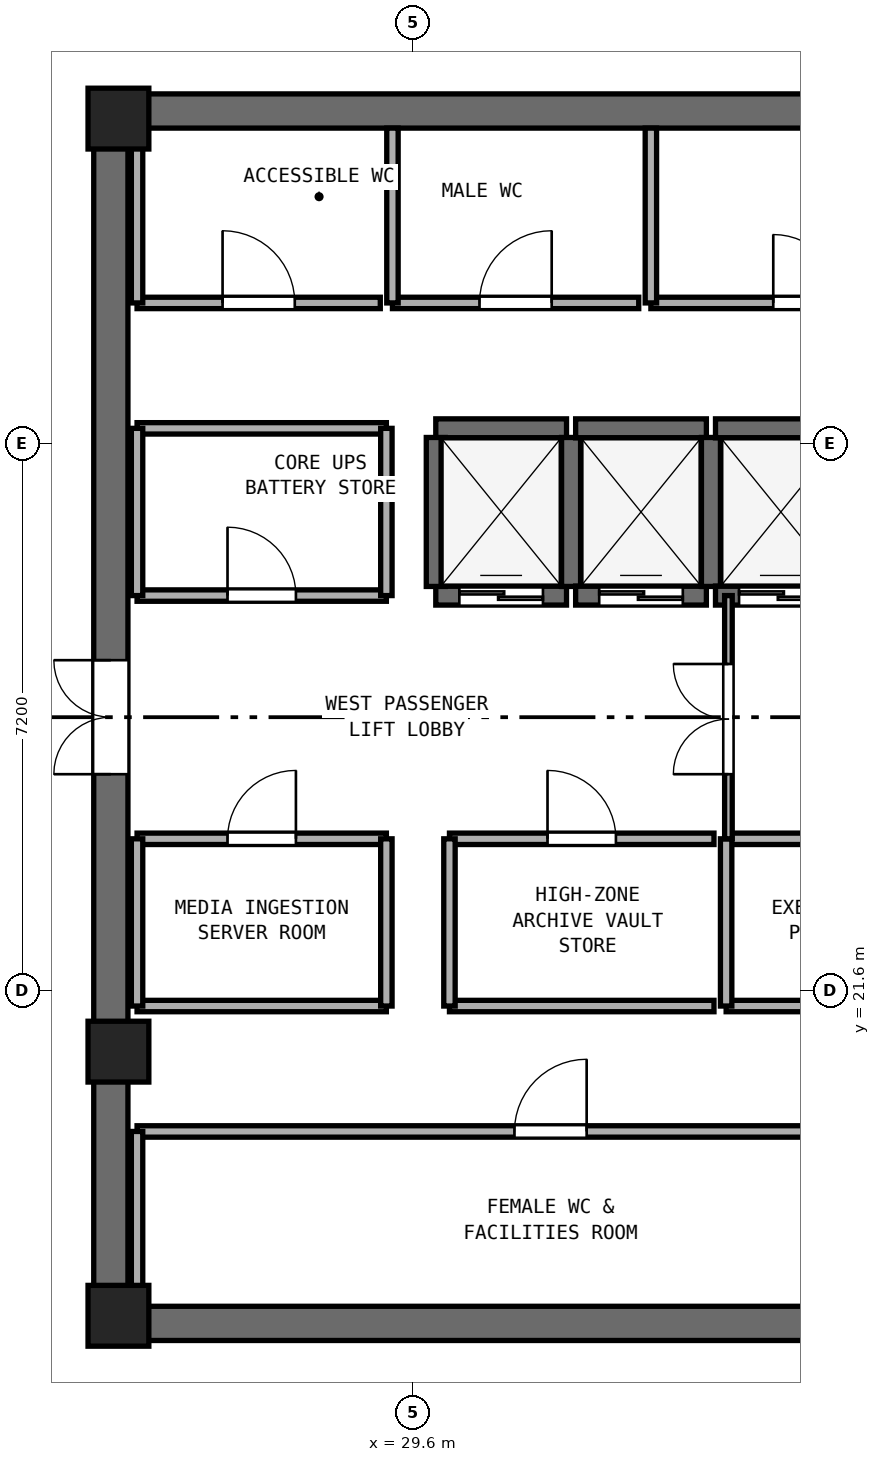
"""IFC4 building model, lengths in metres.
Left out: names, types, materials, properties, quantities, classifications, styles, units other than length and angle.
Written with IfcOpenShell. Run it as: python <this file> out.ifc"""

import sys

from ifc_helpers import new_model, si_unit, direction, frame, frame_2d, origin, origin_2d, place, context, subcontext, project, spatial, rectangle, extrude, element, fill, save


model = new_model("IFC4")
c1 = context("Model", 3, precision=1e-05, world=origin(), true_north=direction((0.0, 1.0)))
c2 = subcontext(c1, "Body", "Model", "MODEL_VIEW")
j1 = project(units=[si_unit("LENGTHUNIT", "METRE"), si_unit("PLANEANGLEUNIT", "RADIAN")], contexts=[c1])
p1 = place(None, origin())
s1 = spatial("IfcSite", under=j1, at=p1, CompositionType="ELEMENT")
p2 = place(p1, origin())
s2 = spatial("IfcBuilding", under=s1, at=p2, CompositionType="ELEMENT")
p3 = place(p2, frame((0.0, 0.0, 247.8)))
s3 = spatial("IfcBuildingStorey", under=s2, at=p3, CompositionType="ELEMENT", Elevation=247.8)
for number, where, z_axis, x_axis in (
    (1, (25.4, 17.225, 0.0), (0.0, 0.0, 1.0), (1.0, 0.0, 0.0)),
    (2, (25.4, 33.175, 0.0), (0.0, 0.0, 1.0), (1.0, 0.0, 0.0)),
):
    element("IfcWall", number, at=place(p3, frame(where, z_axis=z_axis, x_axis=x_axis)), inside=s3, PredefinedType="SHEAR", context=c2, shape_type="SweptSolid", body=[
        extrude(rectangle(XDim=23.2, YDim=0.45, at=frame_2d((11.6, 0.0))), origin(), (0.0, 0.0, 1.0), 3.51),
    ])
p4 = place(p3, frame((25.625, 17.45, 0.0), z_axis=(0.0, 0.0, 1.0), x_axis=(0.0, 1.0, 0.0)))
e3 = element("IfcWall", 3, at=p4, inside=s3, PredefinedType="SHEAR", context=c2, shape_type="SweptSolid", body=[
    extrude(rectangle(XDim=15.5, YDim=0.45, at=frame_2d((7.75, 0.0))), origin(), (0.0, 0.0, 1.0), 3.51),
])
p5 = place(p4, frame((7.0, 0.0, 0.0)))
e4 = element("IfcOpeningElement", 4, at=p5, cuts=e3, PredefinedType="OPENING", context=c2, shape_type="SweptSolid", body=[
    extrude(rectangle(XDim=1.5, YDim=2.15, at=frame_2d((0.75, 1.075))), frame((0.0, 0.235, 0.0), z_axis=(0.0, -1.0, 0.0), x_axis=(1.0, 0.0, 0.0)), (0.0, 0.0, 1.0), 0.47),
])
for number, where, z_axis, x_axis in (
    (5, (25.725, 17.325, 0.0), (0.0, 0.0, 1.0), (1.0, 0.0, 0.0)),
    (6, (25.725, 33.075, 0.0), (0.0, 0.0, 1.0), (1.0, 0.0, 0.0)),
    (7, (25.725, 20.8, 0.0), (0.0, 0.0, 1.0), (1.0, 0.0, 0.0)),
):
    element("IfcColumn", number, at=place(p3, frame(where, z_axis=z_axis, x_axis=x_axis)), inside=s3, PredefinedType="PILASTER", context=c2, shape_type="SweptSolid", body=[
        extrude(rectangle(XDim=0.8, YDim=0.8, at=origin_2d()), origin(), (0.0, 0.0, 1.0), 3.8),
    ])
p6 = place(p3, frame((29.9, 26.8, 0.0), z_axis=(0.0, 0.0, 1.0), x_axis=(1.0, 0.0, 0.0)))
e8 = element("IfcWall", 8, at=p6, inside=s3, PredefinedType="SHEAR", context=c2, shape_type="SweptSolid", body=[
    extrude(rectangle(XDim=1.72, YDim=0.25, at=frame_2d((0.86, 0.0))), origin(), (0.0, 0.0, 1.0), 3.51),
])
p7 = place(p6, frame((0.31, 0.0, 0.0)))
e9 = element("IfcOpeningElement", 9, at=p7, cuts=e8, PredefinedType="OPENING", context=c2, shape_type="SweptSolid", body=[
    extrude(rectangle(XDim=1.1, YDim=2.15, at=frame_2d((0.55, 1.075))), frame((0.0, 0.135, 0.0), z_axis=(0.0, -1.0, 0.0), x_axis=(1.0, 0.0, 0.0)), (0.0, 0.0, 1.0), 0.27),
])
p8 = place(p3, frame((29.9, 29.0, 0.0), z_axis=(0.0, 0.0, 1.0), x_axis=(1.0, 0.0, 0.0)))
e10 = element("IfcWall", 10, at=p8, inside=s3, PredefinedType="SHEAR", context=c2, shape_type="SweptSolid", body=[
    extrude(rectangle(XDim=1.72, YDim=0.25, at=frame_2d((0.86, 0.0))), origin(), (0.0, 0.0, 1.0), 3.51),
])
for number, where, z_axis, x_axis in (
    (11, (29.9, 26.92, 0.0), (0.0, 0.0, 1.0), (0.0, 1.0, 0.0)),
    (12, (31.68, 26.92, 0.0), (0.0, 0.0, 1.0), (0.0, 1.0, 0.0)),
):
    element("IfcWall", number, at=place(p3, frame(where, z_axis=z_axis, x_axis=x_axis)), inside=s3, PredefinedType="SHEAR", context=c2, shape_type="SweptSolid", body=[
        extrude(rectangle(XDim=1.96, YDim=0.25, at=frame_2d((0.98, 0.0))), origin(), (0.0, 0.0, 1.0), 3.51),
    ])
p9 = place(p3, frame((31.74, 26.8, 0.0), z_axis=(0.0, 0.0, 1.0), x_axis=(1.0, 0.0, 0.0)))
e13 = element("IfcWall", 13, at=p9, inside=s3, PredefinedType="SHEAR", context=c2, shape_type="SweptSolid", body=[
    extrude(rectangle(XDim=1.72, YDim=0.25, at=frame_2d((0.86, 0.0))), origin(), (0.0, 0.0, 1.0), 3.51),
])
p10 = place(p9, frame((0.31, 0.0, 0.0)))
e14 = element("IfcOpeningElement", 14, at=p10, cuts=e13, PredefinedType="OPENING", context=c2, shape_type="SweptSolid", body=[
    extrude(rectangle(XDim=1.1, YDim=2.15, at=frame_2d((0.55, 1.075))), frame((0.0, 0.135, 0.0), z_axis=(0.0, -1.0, 0.0), x_axis=(1.0, 0.0, 0.0)), (0.0, 0.0, 1.0), 0.27),
])
p11 = place(p3, frame((31.74, 29.0, 0.0), z_axis=(0.0, 0.0, 1.0), x_axis=(1.0, 0.0, 0.0)))
e15 = element("IfcWall", 15, at=p11, inside=s3, PredefinedType="SHEAR", context=c2, shape_type="SweptSolid", body=[
    extrude(rectangle(XDim=1.72, YDim=0.25, at=frame_2d((0.86, 0.0))), origin(), (0.0, 0.0, 1.0), 3.51),
])
p12 = place(p3, frame((33.52, 26.92, 0.0), z_axis=(0.0, 0.0, 1.0), x_axis=(0.0, 1.0, 0.0)))
e16 = element("IfcWall", 16, at=p12, inside=s3, PredefinedType="SHEAR", context=c2, shape_type="SweptSolid", body=[
    extrude(rectangle(XDim=1.96, YDim=0.25, at=frame_2d((0.98, 0.0))), origin(), (0.0, 0.0, 1.0), 3.51),
])
p13 = place(p3, frame((33.58, 26.8, 0.0), z_axis=(0.0, 0.0, 1.0), x_axis=(1.0, 0.0, 0.0)))
e17 = element("IfcWall", 17, at=p13, inside=s3, PredefinedType="SHEAR", context=c2, shape_type="SweptSolid", body=[
    extrude(rectangle(XDim=1.72, YDim=0.25, at=frame_2d((0.86, 0.0))), origin(), (0.0, 0.0, 1.0), 3.51),
])
p14 = place(p13, frame((0.31, 0.0, 0.0)))
e18 = element("IfcOpeningElement", 18, at=p14, cuts=e17, PredefinedType="OPENING", context=c2, shape_type="SweptSolid", body=[
    extrude(rectangle(XDim=1.1, YDim=2.15, at=frame_2d((0.55, 1.075))), frame((0.0, 0.135, 0.0), z_axis=(0.0, -1.0, 0.0), x_axis=(1.0, 0.0, 0.0)), (0.0, 0.0, 1.0), 0.27),
])
p15 = place(p3, frame((33.58, 29.0, 0.0), z_axis=(0.0, 0.0, 1.0), x_axis=(1.0, 0.0, 0.0)))
e19 = element("IfcWall", 19, at=p15, inside=s3, PredefinedType="SHEAR", context=c2, shape_type="SweptSolid", body=[
    extrude(rectangle(XDim=1.72, YDim=0.25, at=frame_2d((0.86, 0.0))), origin(), (0.0, 0.0, 1.0), 3.51),
])
p16 = place(p3, frame((25.97, 30.65, 0.0), z_axis=(0.0, 0.0, 1.0), x_axis=(1.0, 0.0, 0.0)))
e20 = element("IfcWall", 20, at=p16, inside=s3, PredefinedType="PARTITIONING", context=c2, shape_type="SweptSolid", body=[
    extrude(rectangle(XDim=3.2, YDim=0.15, at=frame_2d((1.6, 0.0))), origin(), (0.0, 0.0, 1.0), 3.51),
])
p17 = place(p16, frame((1.125, 0.0, 0.0)))
e21 = element("IfcOpeningElement", 21, at=p17, cuts=e20, PredefinedType="OPENING", context=c2, shape_type="SweptSolid", body=[
    extrude(rectangle(XDim=0.95, YDim=2.1, at=frame_2d((0.475, 1.05))), frame((0.0, 0.085, 0.0), z_axis=(0.0, -1.0, 0.0), x_axis=(1.0, 0.0, 0.0)), (0.0, 0.0, 1.0), 0.17),
])
p18 = place(p3, frame((25.97, 30.65, 0.0), z_axis=(0.0, 0.0, 1.0), x_axis=(0.0, 1.0, 0.0)))
e22 = element("IfcWall", 22, at=p18, inside=s3, PredefinedType="PARTITIONING", context=c2, shape_type="SweptSolid", body=[
    extrude(rectangle(XDim=2.3, YDim=0.15, at=frame_2d((1.15, 0.0))), origin(), (0.0, 0.0, 1.0), 2.61),
])
p19 = place(p3, frame((29.33, 30.65, 0.0), z_axis=(0.0, 0.0, 1.0), x_axis=(1.0, 0.0, 0.0)))
e23 = element("IfcWall", 23, at=p19, inside=s3, PredefinedType="PARTITIONING", context=c2, shape_type="SweptSolid", body=[
    extrude(rectangle(XDim=3.24, YDim=0.15, at=frame_2d((1.62, 0.0))), origin(), (0.0, 0.0, 1.0), 3.51),
])
p20 = place(p19, frame((1.145, 0.0, 0.0)))
e24 = element("IfcOpeningElement", 24, at=p20, cuts=e23, PredefinedType="OPENING", context=c2, shape_type="SweptSolid", body=[
    extrude(rectangle(XDim=0.95, YDim=2.1, at=frame_2d((0.475, 1.05))), frame((0.0, 0.085, 0.0), z_axis=(0.0, -1.0, 0.0), x_axis=(1.0, 0.0, 0.0)), (0.0, 0.0, 1.0), 0.17),
])
p21 = place(p3, frame((29.33, 30.65, 0.0), z_axis=(0.0, 0.0, 1.0), x_axis=(0.0, 1.0, 0.0)))
e25 = element("IfcWall", 25, at=p21, inside=s3, PredefinedType="PARTITIONING", context=c2, shape_type="SweptSolid", body=[
    extrude(rectangle(XDim=2.3, YDim=0.15, at=frame_2d((1.15, 0.0))), origin(), (0.0, 0.0, 1.0), 3.51),
])
p22 = place(p3, frame((32.73, 30.65, 0.0), z_axis=(0.0, 0.0, 1.0), x_axis=(1.0, 0.0, 0.0)))
e26 = element("IfcWall", 26, at=p22, inside=s3, PredefinedType="PARTITIONING", context=c2, shape_type="SweptSolid", body=[
    extrude(rectangle(XDim=4.12, YDim=0.15, at=frame_2d((2.06, 0.0))), origin(), (0.0, 0.0, 1.0), 3.51),
])
p23 = place(p22, frame((1.61, 0.0, 0.0)))
e27 = element("IfcOpeningElement", 27, at=p23, cuts=e26, PredefinedType="OPENING", context=c2, shape_type="SweptSolid", body=[
    extrude(rectangle(XDim=0.9, YDim=2.1, at=frame_2d((0.45, 1.05))), frame((0.0, 0.085, 0.0), z_axis=(0.0, -1.0, 0.0), x_axis=(1.0, 0.0, 0.0)), (0.0, 0.0, 1.0), 0.17),
])
p24 = place(p3, frame((32.73, 30.65, 0.0), z_axis=(0.0, 0.0, 1.0), x_axis=(0.0, 1.0, 0.0)))
e28 = element("IfcWall", 28, at=p24, inside=s3, PredefinedType="PARTITIONING", context=c2, shape_type="SweptSolid", body=[
    extrude(rectangle(XDim=2.3, YDim=0.15, at=frame_2d((1.15, 0.0))), origin(), (0.0, 0.0, 1.0), 3.51),
])
p25 = place(p3, frame((25.97, 19.75, 0.0), z_axis=(0.0, 0.0, 1.0), x_axis=(1.0, 0.0, 0.0)))
e29 = element("IfcWall", 29, at=p25, inside=s3, PredefinedType="PARTITIONING", context=c2, shape_type="SweptSolid", body=[
    extrude(rectangle(XDim=10.88, YDim=0.15, at=frame_2d((5.44, 0.0))), origin(), (0.0, 0.0, 1.0), 3.51),
])
p26 = place(p25, frame((4.965, 0.0, 0.0)))
e30 = element("IfcOpeningElement", 30, at=p26, cuts=e29, PredefinedType="OPENING", context=c2, shape_type="SweptSolid", body=[
    extrude(rectangle(XDim=0.95, YDim=2.1, at=frame_2d((0.475, 1.05))), frame((0.0, 0.085, 0.0), z_axis=(0.0, -1.0, 0.0), x_axis=(1.0, 0.0, 0.0)), (0.0, 0.0, 1.0), 0.17),
])
p27 = place(p3, frame((25.97, 17.45, 0.0), z_axis=(0.0, 0.0, 1.0), x_axis=(0.0, 1.0, 0.0)))
e31 = element("IfcWall", 31, at=p27, inside=s3, PredefinedType="PARTITIONING", context=c2, shape_type="SweptSolid", body=[
    extrude(rectangle(XDim=2.3, YDim=0.15, at=frame_2d((1.15, 0.0))), origin(), (0.0, 0.0, 1.0), 2.61),
])
p28 = place(p3, frame((25.97, 26.8, 0.0), z_axis=(0.0, 0.0, 1.0), x_axis=(1.0, 0.0, 0.0)))
e32 = element("IfcWall", 32, at=p28, inside=s3, PredefinedType="PARTITIONING", context=c2, shape_type="SweptSolid", body=[
    extrude(rectangle(XDim=3.28, YDim=0.15, at=frame_2d((1.64, 0.0))), origin(), (0.0, 0.0, 1.0), 3.51),
])
p29 = place(p28, frame((1.19, 0.0, 0.0)))
e33 = element("IfcOpeningElement", 33, at=p29, cuts=e32, PredefinedType="OPENING", context=c2, shape_type="SweptSolid", body=[
    extrude(rectangle(XDim=0.9, YDim=2.1, at=frame_2d((0.45, 1.05))), frame((0.0, 0.085, 0.0), z_axis=(0.0, -1.0, 0.0), x_axis=(1.0, 0.0, 0.0)), (0.0, 0.0, 1.0), 0.17),
])
p30 = place(p3, frame((25.97, 29.0, 0.0), z_axis=(0.0, 0.0, 1.0), x_axis=(1.0, 0.0, 0.0)))
e34 = element("IfcWall", 34, at=p30, inside=s3, PredefinedType="PARTITIONING", context=c2, shape_type="SweptSolid", body=[
    extrude(rectangle(XDim=3.28, YDim=0.15, at=frame_2d((1.64, 0.0))), origin(), (0.0, 0.0, 1.0), 3.51),
])
p31 = place(p3, frame((25.97, 26.8, 0.0), z_axis=(0.0, 0.0, 1.0), x_axis=(0.0, 1.0, 0.0)))
e35 = element("IfcWall", 35, at=p31, inside=s3, PredefinedType="PARTITIONING", context=c2, shape_type="SweptSolid", body=[
    extrude(rectangle(XDim=2.2, YDim=0.15, at=frame_2d((1.1, 0.0))), origin(), (0.0, 0.0, 1.0), 2.61),
])
p32 = place(p3, frame((29.25, 26.8, 0.0), z_axis=(0.0, 0.0, 1.0), x_axis=(0.0, 1.0, 0.0)))
e36 = element("IfcWall", 36, at=p32, inside=s3, PredefinedType="PARTITIONING", context=c2, shape_type="SweptSolid", body=[
    extrude(rectangle(XDim=2.2, YDim=0.15, at=frame_2d((1.1, 0.0))), origin(), (0.0, 0.0, 1.0), 3.51),
])
p33 = place(p3, frame((25.97, 21.4, 0.0), z_axis=(0.0, 0.0, 1.0), x_axis=(1.0, 0.0, 0.0)))
e37 = element("IfcWall", 37, at=p33, inside=s3, PredefinedType="PARTITIONING", context=c2, shape_type="SweptSolid", body=[
    extrude(rectangle(XDim=3.28, YDim=0.15, at=frame_2d((1.64, 0.0))), origin(), (0.0, 0.0, 1.0), 3.51),
])
p34 = place(p3, frame((25.97, 23.6, 0.0), z_axis=(0.0, 0.0, 1.0), x_axis=(1.0, 0.0, 0.0)))
e38 = element("IfcWall", 38, at=p34, inside=s3, PredefinedType="PARTITIONING", context=c2, shape_type="SweptSolid", body=[
    extrude(rectangle(XDim=3.28, YDim=0.15, at=frame_2d((1.64, 0.0))), origin(), (0.0, 0.0, 1.0), 3.51),
])
p35 = place(p34, frame((1.19, 0.0, 0.0)))
e39 = element("IfcOpeningElement", 39, at=p35, cuts=e38, PredefinedType="OPENING", context=c2, shape_type="SweptSolid", body=[
    extrude(rectangle(XDim=0.9, YDim=2.1, at=frame_2d((0.45, 1.05))), frame((0.0, 0.085, 0.0), z_axis=(0.0, -1.0, 0.0), x_axis=(1.0, 0.0, 0.0)), (0.0, 0.0, 1.0), 0.17),
])
p36 = place(p3, frame((25.97, 21.4, 0.0), z_axis=(0.0, 0.0, 1.0), x_axis=(0.0, 1.0, 0.0)))
e40 = element("IfcWall", 40, at=p36, inside=s3, PredefinedType="PARTITIONING", context=c2, shape_type="SweptSolid", body=[
    extrude(rectangle(XDim=2.2, YDim=0.15, at=frame_2d((1.1, 0.0))), origin(), (0.0, 0.0, 1.0), 2.61),
])
p37 = place(p3, frame((29.25, 21.4, 0.0), z_axis=(0.0, 0.0, 1.0), x_axis=(0.0, 1.0, 0.0)))
e41 = element("IfcWall", 41, at=p37, inside=s3, PredefinedType="PARTITIONING", context=c2, shape_type="SweptSolid", body=[
    extrude(rectangle(XDim=2.2, YDim=0.15, at=frame_2d((1.1, 0.0))), origin(), (0.0, 0.0, 1.0), 3.51),
])
p38 = place(p3, frame((30.08, 21.4, 0.0), z_axis=(0.0, 0.0, 1.0), x_axis=(1.0, 0.0, 0.0)))
e42 = element("IfcWall", 42, at=p38, inside=s3, PredefinedType="PARTITIONING", context=c2, shape_type="SweptSolid", body=[
    extrude(rectangle(XDim=3.48, YDim=0.15, at=frame_2d((1.74, 0.0))), origin(), (0.0, 0.0, 1.0), 3.51),
])
p39 = place(p3, frame((30.08, 23.6, 0.0), z_axis=(0.0, 0.0, 1.0), x_axis=(1.0, 0.0, 0.0)))
e43 = element("IfcWall", 43, at=p39, inside=s3, PredefinedType="PARTITIONING", context=c2, shape_type="SweptSolid", body=[
    extrude(rectangle(XDim=3.48, YDim=0.15, at=frame_2d((1.74, 0.0))), origin(), (0.0, 0.0, 1.0), 3.51),
])
p40 = place(p39, frame((1.29, 0.0, 0.0)))
e44 = element("IfcOpeningElement", 44, at=p40, cuts=e43, PredefinedType="OPENING", context=c2, shape_type="SweptSolid", body=[
    extrude(rectangle(XDim=0.9, YDim=2.1, at=frame_2d((0.45, 1.05))), frame((0.0, 0.085, 0.0), z_axis=(0.0, -1.0, 0.0), x_axis=(1.0, 0.0, 0.0)), (0.0, 0.0, 1.0), 0.17),
])
p41 = place(p3, frame((30.08, 21.4, 0.0), z_axis=(0.0, 0.0, 1.0), x_axis=(0.0, 1.0, 0.0)))
e45 = element("IfcWall", 45, at=p41, inside=s3, PredefinedType="PARTITIONING", context=c2, shape_type="SweptSolid", body=[
    extrude(rectangle(XDim=2.2, YDim=0.15, at=frame_2d((1.1, 0.0))), origin(), (0.0, 0.0, 1.0), 3.51),
])
p42 = place(p3, frame((33.72, 21.4, 0.0), z_axis=(0.0, 0.0, 1.0), x_axis=(1.0, 0.0, 0.0)))
e46 = element("IfcWall", 46, at=p42, inside=s3, PredefinedType="PARTITIONING", context=c2, shape_type="SweptSolid", body=[
    extrude(rectangle(XDim=3.48, YDim=0.15, at=frame_2d((1.74, 0.0))), origin(), (0.0, 0.0, 1.0), 3.51),
])
p43 = place(p3, frame((33.72, 23.6, 0.0), z_axis=(0.0, 0.0, 1.0), x_axis=(1.0, 0.0, 0.0)))
e47 = element("IfcWall", 47, at=p43, inside=s3, PredefinedType="PARTITIONING", context=c2, shape_type="SweptSolid", body=[
    extrude(rectangle(XDim=3.48, YDim=0.15, at=frame_2d((1.74, 0.0))), origin(), (0.0, 0.0, 1.0), 3.51),
])
p44 = place(p43, frame((1.29, 0.0, 0.0)))
e48 = element("IfcOpeningElement", 48, at=p44, cuts=e47, PredefinedType="OPENING", context=c2, shape_type="SweptSolid", body=[
    extrude(rectangle(XDim=0.9, YDim=2.1, at=frame_2d((0.45, 1.05))), frame((0.0, 0.085, 0.0), z_axis=(0.0, -1.0, 0.0), x_axis=(1.0, 0.0, 0.0)), (0.0, 0.0, 1.0), 0.17),
])
p45 = place(p3, frame((33.72, 21.4, 0.0), z_axis=(0.0, 0.0, 1.0), x_axis=(0.0, 1.0, 0.0)))
e49 = element("IfcWall", 49, at=p45, inside=s3, PredefinedType="PARTITIONING", context=c2, shape_type="SweptSolid", body=[
    extrude(rectangle(XDim=2.2, YDim=0.15, at=frame_2d((1.1, 0.0))), origin(), (0.0, 0.0, 1.0), 3.51),
])
p46 = place(p3, frame((33.75, 23.6, 0.0), z_axis=(0.0, 0.0, 1.0), x_axis=(0.0, 1.0, 0.0)))
e50 = element("IfcWall", 50, at=p46, inside=s3, PredefinedType="PARTITIONING", context=c2, shape_type="SweptSolid", body=[
    extrude(rectangle(XDim=3.2, YDim=0.1, at=frame_2d((1.6, 0.0))), origin(), (0.0, 0.0, 1.0), 3.51),
])
p47 = place(p46, frame((0.85, 0.0, 0.0)))
e51 = element("IfcOpeningElement", 51, at=p47, cuts=e50, PredefinedType="OPENING", context=c2, shape_type="SweptSolid", body=[
    extrude(rectangle(XDim=1.45, YDim=2.12, at=frame_2d((0.725, 1.06))), frame((0.0, 0.06, 0.0), z_axis=(0.0, -1.0, 0.0), x_axis=(1.0, 0.0, 0.0)), (0.0, 0.0, 1.0), 0.12),
])
p48 = place(p7, origin())
e52 = element("IfcDoor", 52, at=p48, inside=s3, OperationType="DOUBLE_DOOR_SLIDING", PredefinedType="DOOR", context=c2, shape_type="SweptSolid", body=[
    extrude(rectangle(XDim=1.1, YDim=2.15, at=frame_2d((0.55, 1.075))), frame((0.0, 0.025, 0.0), z_axis=(0.0, -1.0, 0.0), x_axis=(1.0, 0.0, 0.0)), (0.0, 0.0, 1.0), 0.05),
])
fill(e9, e52)
p49 = place(p10, origin())
e53 = element("IfcDoor", 53, at=p49, inside=s3, OperationType="DOUBLE_DOOR_SLIDING", PredefinedType="DOOR", context=c2, shape_type="SweptSolid", body=[
    extrude(rectangle(XDim=1.1, YDim=2.15, at=frame_2d((0.55, 1.075))), frame((0.0, 0.025, 0.0), z_axis=(0.0, -1.0, 0.0), x_axis=(1.0, 0.0, 0.0)), (0.0, 0.0, 1.0), 0.05),
])
fill(e14, e53)
p50 = place(p14, origin())
e54 = element("IfcDoor", 54, at=p50, inside=s3, OperationType="DOUBLE_DOOR_SLIDING", PredefinedType="DOOR", context=c2, shape_type="SweptSolid", body=[
    extrude(rectangle(XDim=1.1, YDim=2.15, at=frame_2d((0.55, 1.075))), frame((0.0, 0.025, 0.0), z_axis=(0.0, -1.0, 0.0), x_axis=(1.0, 0.0, 0.0)), (0.0, 0.0, 1.0), 0.05),
])
fill(e18, e54)
p51 = place(p5, origin())
e55 = element("IfcDoor", 55, at=p51, inside=s3, OperationType="DOUBLE_DOOR_SINGLE_SWING", PredefinedType="DOOR", context=c2, shape_type="SweptSolid", body=[
    extrude(rectangle(XDim=1.5, YDim=2.15, at=frame_2d((0.75, 1.075))), frame((0.0, 0.025, 0.0), z_axis=(0.0, -1.0, 0.0), x_axis=(1.0, 0.0, 0.0)), (0.0, 0.0, 1.0), 0.05),
])
fill(e4, e55)
p52 = place(p17, origin())
e56 = element("IfcDoor", 56, at=p52, inside=s3, OperationType="SINGLE_SWING_LEFT", PredefinedType="DOOR", context=c2, shape_type="SweptSolid", body=[
    extrude(rectangle(XDim=0.95, YDim=2.1, at=frame_2d((0.475, 1.05))), frame((0.0, 0.025, 0.0), z_axis=(0.0, -1.0, 0.0), x_axis=(1.0, 0.0, 0.0)), (0.0, 0.0, 1.0), 0.05),
])
fill(e21, e56)
p53 = place(p20, origin())
e57 = element("IfcDoor", 57, at=p53, inside=s3, OperationType="SINGLE_SWING_RIGHT", PredefinedType="DOOR", context=c2, shape_type="SweptSolid", body=[
    extrude(rectangle(XDim=0.95, YDim=2.1, at=frame_2d((0.475, 1.05))), frame((0.0, 0.025, 0.0), z_axis=(0.0, -1.0, 0.0), x_axis=(1.0, 0.0, 0.0)), (0.0, 0.0, 1.0), 0.05),
])
fill(e24, e57)
p54 = place(p23, origin())
e58 = element("IfcDoor", 58, at=p54, inside=s3, OperationType="SINGLE_SWING_LEFT", PredefinedType="DOOR", context=c2, shape_type="SweptSolid", body=[
    extrude(rectangle(XDim=0.9, YDim=2.1, at=frame_2d((0.45, 1.05))), frame((0.0, 0.025, 0.0), z_axis=(0.0, -1.0, 0.0), x_axis=(1.0, 0.0, 0.0)), (0.0, 0.0, 1.0), 0.05),
])
fill(e27, e58)
p55 = place(p26, origin())
e59 = element("IfcDoor", 59, at=p55, inside=s3, OperationType="SINGLE_SWING_RIGHT", PredefinedType="DOOR", context=c2, shape_type="SweptSolid", body=[
    extrude(rectangle(XDim=0.95, YDim=2.1, at=frame_2d((0.475, 1.05))), frame((0.0, 0.025, 0.0), z_axis=(0.0, -1.0, 0.0), x_axis=(1.0, 0.0, 0.0)), (0.0, 0.0, 1.0), 0.05),
])
fill(e30, e59)
p56 = place(p29, origin())
e60 = element("IfcDoor", 60, at=p56, inside=s3, OperationType="SINGLE_SWING_LEFT", PredefinedType="DOOR", context=c2, shape_type="SweptSolid", body=[
    extrude(rectangle(XDim=0.9, YDim=2.1, at=frame_2d((0.45, 1.05))), frame((0.0, 0.025, 0.0), z_axis=(0.0, -1.0, 0.0), x_axis=(1.0, 0.0, 0.0)), (0.0, 0.0, 1.0), 0.05),
])
fill(e33, e60)
p57 = place(p35, origin())
e61 = element("IfcDoor", 61, at=p57, inside=s3, OperationType="SINGLE_SWING_RIGHT", PredefinedType="DOOR", context=c2, shape_type="SweptSolid", body=[
    extrude(rectangle(XDim=0.9, YDim=2.1, at=frame_2d((0.45, 1.05))), frame((0.0, 0.025, 0.0), z_axis=(0.0, -1.0, 0.0), x_axis=(1.0, 0.0, 0.0)), (0.0, 0.0, 1.0), 0.05),
])
fill(e39, e61)
p58 = place(p40, origin())
e62 = element("IfcDoor", 62, at=p58, inside=s3, OperationType="SINGLE_SWING_LEFT", PredefinedType="DOOR", context=c2, shape_type="SweptSolid", body=[
    extrude(rectangle(XDim=0.9, YDim=2.1, at=frame_2d((0.45, 1.05))), frame((0.0, 0.025, 0.0), z_axis=(0.0, -1.0, 0.0), x_axis=(1.0, 0.0, 0.0)), (0.0, 0.0, 1.0), 0.05),
])
fill(e44, e62)
p59 = place(p47, origin())
e63 = element("IfcDoor", 63, at=p59, inside=s3, OperationType="DOUBLE_DOOR_SINGLE_SWING", PredefinedType="DOOR", context=c2, shape_type="SweptSolid", body=[
    extrude(rectangle(XDim=1.45, YDim=2.12, at=frame_2d((0.725, 1.06))), frame((0.0, 0.025, 0.0), z_axis=(0.0, -1.0, 0.0), x_axis=(1.0, 0.0, 0.0)), (0.0, 0.0, 1.0), 0.05),
])
fill(e51, e63)
save(model, sys.argv[1])
